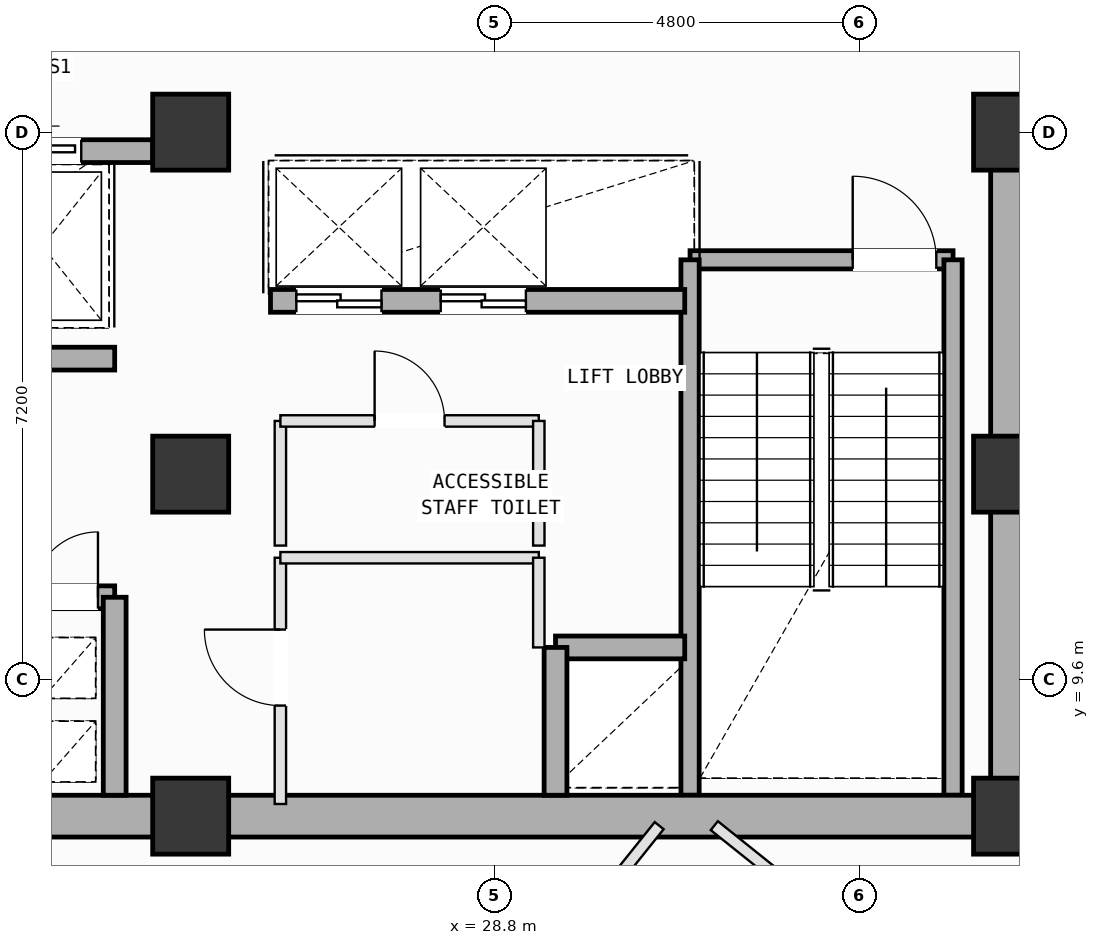
"""IFC4 building model, lengths in metres.
Left out: names, types, materials, properties, quantities, classifications, styles, units other than length and angle.
Written with IfcOpenShell. Run it as: python <this file> out.ifc"""

import sys

from ifc_helpers import new_model, si_unit, direction, frame, frame_2d, origin, origin_2d, place, context, subcontext, project, spatial, rectangle, extrude, element, fill, save


model = new_model("IFC4")
c1 = context("Model", 3, precision=1e-05, world=origin(), true_north=direction((0.0, 1.0)))
c2 = subcontext(c1, "Body", "Model", "MODEL_VIEW")
j1 = project(units=[si_unit("LENGTHUNIT", "METRE"), si_unit("PLANEANGLEUNIT", "RADIAN")], contexts=[c1])
p1 = place(None, origin())
s1 = spatial("IfcSite", under=j1, at=p1, CompositionType="ELEMENT")
p2 = place(p1, origin())
s2 = spatial("IfcBuilding", under=s1, at=p2, CompositionType="ELEMENT")
p3 = place(p2, frame((0.0, 0.0, 243.2)))
s3 = spatial("IfcBuildingStorey", under=s2, at=p3, CompositionType="ELEMENT", Elevation=243.2)
for number, where, z_axis, x_axis in (
    (1, (24.8, 7.8, 0.0), (0.0, 0.0, 1.0), (1.0, 0.0, 0.0)),
    (2, (24.8, 12.3, 0.0), (0.0, 0.0, 1.0), (1.0, 0.0, 0.0)),
    (3, (24.8, 16.8, 0.0), (0.0, 0.0, 1.0), (1.0, 0.0, 0.0)),
    (4, (35.6, 7.8, 0.0), (0.0, 0.0, 1.0), (1.0, 0.0, 0.0)),
    (5, (35.6, 12.3, 0.0), (0.0, 0.0, 1.0), (1.0, 0.0, 0.0)),
    (6, (35.6, 16.8, 0.0), (0.0, 0.0, 1.0), (1.0, 0.0, 0.0)),
):
    element("IfcColumn", number, at=place(p3, frame(where, z_axis=z_axis, x_axis=x_axis)), inside=s3, PredefinedType="COLUMN", context=c2, shape_type="SweptSolid", body=[
        extrude(rectangle(XDim=1.0, YDim=1.0, at=origin_2d()), origin(), (0.0, 0.0, 1.0), 4.0),
    ])
p4 = place(p3, frame((31.37, 15.12, 0.0), z_axis=(0.0, 0.0, 1.0), x_axis=(1.0, 0.0, 0.0)))
e7 = element("IfcWall", 7, at=p4, inside=s3, PredefinedType="SOLIDWALL", context=c2, shape_type="SweptSolid", body=[
    extrude(rectangle(XDim=3.46, YDim=0.24, at=frame_2d((1.73, 0.0))), origin(), (0.0, 0.0, 1.0), 3.78),
])
p5 = place(p4, frame((2.14, 0.0, 0.0)))
e8 = element("IfcOpeningElement", 8, at=p5, cuts=e7, PredefinedType="OPENING", context=c2, shape_type="SweptSolid", body=[
    extrude(rectangle(XDim=1.1, YDim=2.15, at=frame_2d((0.55, 1.075))), frame((0.0, 0.13, 0.0), z_axis=(0.0, -1.0, 0.0), x_axis=(1.0, 0.0, 0.0)), (0.0, 0.0, 1.0), 0.26),
])
for number, where, z_axis, x_axis in (
    (9, (34.83, 15.12, 0.0), (0.0, 0.0, 1.0), (0.0, -1.0, 0.0)),
    (10, (31.37, 8.075, 0.0), (0.0, 0.0, 1.0), (0.0, 1.0, 0.0)),
):
    element("IfcWall", number, at=place(p3, frame(where, z_axis=z_axis, x_axis=x_axis)), inside=s3, PredefinedType="SOLIDWALL", context=c2, shape_type="SweptSolid", body=[
        extrude(rectangle(XDim=7.045, YDim=0.24, at=frame_2d((3.522, 0.0))), origin(), (0.0, 0.0, 1.0), 3.78),
    ])
for number, where, z_axis, x_axis in (
    (11, (14.0, 7.8, 0.0), (0.0, 0.0, 1.0), (1.0, 0.0, 0.0)),
    (12, (24.8, 7.8, 0.0), (0.0, 0.0, 1.0), (1.0, 0.0, 0.0)),
):
    element("IfcWall", number, at=place(p3, frame(where, z_axis=z_axis, x_axis=x_axis)), inside=s3, PredefinedType="SHEAR", context=c2, shape_type="SweptSolid", body=[
        extrude(rectangle(XDim=10.8, YDim=0.55, at=frame_2d((5.4, 0.0))), origin(), (0.0, 0.0, 1.0), 3.78),
    ])
p6 = place(p3, frame((35.6, 7.8, 0.0), z_axis=(0.0, 0.0, 1.0), x_axis=(0.0, 1.0, 0.0)))
e13 = element("IfcWall", 13, at=p6, inside=s3, PredefinedType="SHEAR", context=c2, shape_type="SweptSolid", body=[
    extrude(rectangle(XDim=9.0, YDim=0.55, at=frame_2d((4.5, 0.0))), origin(), (0.0, 0.0, 1.0), 3.78),
])
p7 = place(p3, frame((19.85, 16.55, 0.0), z_axis=(0.0, 0.0, 1.0), x_axis=(1.0, 0.0, 0.0)))
e14 = element("IfcWall", 14, at=p7, inside=s3, PredefinedType="SOLIDWALL", context=c2, shape_type="SweptSolid", body=[
    extrude(rectangle(XDim=4.45, YDim=0.3, at=frame_2d((2.225, 0.0))), origin(), (0.0, 0.0, 1.0), 3.78),
])
p8 = place(p7, frame((0.475, 0.0, 0.0)))
e15 = element("IfcOpeningElement", 15, at=p8, cuts=e14, PredefinedType="OPENING", context=c2, shape_type="SweptSolid", body=[
    extrude(rectangle(XDim=1.25, YDim=2.18, at=frame_2d((0.625, 1.09))), frame((0.0, 0.16, 0.0), z_axis=(0.0, -1.0, 0.0), x_axis=(1.0, 0.0, 0.0)), (0.0, 0.0, 1.0), 0.32),
])
p9 = place(p7, frame((2.49, 0.0, 0.0)))
e16 = element("IfcOpeningElement", 16, at=p9, cuts=e14, PredefinedType="OPENING", context=c2, shape_type="SweptSolid", body=[
    extrude(rectangle(XDim=1.02, YDim=2.12, at=frame_2d((0.51, 1.06))), frame((0.0, 0.16, 0.0), z_axis=(0.0, -1.0, 0.0), x_axis=(1.0, 0.0, 0.0)), (0.0, 0.0, 1.0), 0.32),
])
p10 = place(p3, frame((18.5, 10.68, 0.0), z_axis=(0.0, 0.0, 1.0), x_axis=(1.0, 0.0, 0.0)))
e17 = element("IfcWall", 17, at=p10, inside=s3, PredefinedType="SOLIDWALL", context=c2, shape_type="SweptSolid", body=[
    extrude(rectangle(XDim=5.3, YDim=0.3, at=frame_2d((2.65, 0.0))), origin(), (0.0, 0.0, 1.0), 3.78),
])
p11 = place(p10, frame((4.22, 0.0, 0.0)))
e18 = element("IfcOpeningElement", 18, at=p11, cuts=e17, PredefinedType="OPENING", context=c2, shape_type="SweptSolid", body=[
    extrude(rectangle(XDim=0.86, YDim=2.06, at=frame_2d((0.43, 1.03))), frame((0.0, 0.16, 0.0), z_axis=(0.0, -1.0, 0.0), x_axis=(1.0, 0.0, 0.0)), (0.0, 0.0, 1.0), 0.32),
])
p12 = place(p10, frame((0.425, 0.0, 0.0)))
e19 = element("IfcOpeningElement", 19, at=p12, cuts=e17, PredefinedType="OPENING", context=c2, shape_type="SweptSolid", body=[
    extrude(rectangle(XDim=1.25, YDim=2.18, at=frame_2d((0.625, 1.09))), frame((0.0, 0.16, 0.0), z_axis=(0.0, -1.0, 0.0), x_axis=(1.0, 0.0, 0.0)), (0.0, 0.0, 1.0), 0.32),
])
p13 = place(p10, frame((2.525, 0.0, 0.0)))
e20 = element("IfcOpeningElement", 20, at=p13, cuts=e17, PredefinedType="OPENING", context=c2, shape_type="SweptSolid", body=[
    extrude(rectangle(XDim=1.25, YDim=2.18, at=frame_2d((0.625, 1.09))), frame((0.0, 0.16, 0.0), z_axis=(0.0, -1.0, 0.0), x_axis=(1.0, 0.0, 0.0)), (0.0, 0.0, 1.0), 0.32),
])
p14 = place(p3, frame((18.5, 13.82, 0.0), z_axis=(0.0, 0.0, 1.0), x_axis=(1.0, 0.0, 0.0)))
e21 = element("IfcWall", 21, at=p14, inside=s3, PredefinedType="SOLIDWALL", context=c2, shape_type="SweptSolid", body=[
    extrude(rectangle(XDim=5.3, YDim=0.3, at=frame_2d((2.65, 0.0))), origin(), (0.0, 0.0, 1.0), 3.78),
])
p15 = place(p14, frame((0.18, 0.0, 0.0)))
e22 = element("IfcOpeningElement", 22, at=p15, cuts=e21, PredefinedType="OPENING", context=c2, shape_type="SweptSolid", body=[
    extrude(rectangle(XDim=1.1, YDim=2.15, at=frame_2d((0.55, 1.075))), frame((0.0, 0.16, 0.0), z_axis=(0.0, -1.0, 0.0), x_axis=(1.0, 0.0, 0.0)), (0.0, 0.0, 1.0), 0.32),
])
p16 = place(p3, frame((23.8, 8.075, 0.0), z_axis=(0.0, 0.0, 1.0), x_axis=(0.0, 1.0, 0.0)))
e23 = element("IfcWall", 23, at=p16, inside=s3, PredefinedType="SOLIDWALL", context=c2, shape_type="SweptSolid", body=[
    extrude(rectangle(XDim=2.605, YDim=0.3, at=frame_2d((1.302, 0.0))), origin(), (0.0, 0.0, 1.0), 3.78),
])
p17 = place(p3, frame((29.6, 10.02, 0.0), z_axis=(0.0, 0.0, 1.0), x_axis=(1.0, 0.0, 0.0)))
e24 = element("IfcWall", 24, at=p17, inside=s3, PredefinedType="SOLIDWALL", context=c2, shape_type="SweptSolid", body=[
    extrude(rectangle(XDim=1.7, YDim=0.3, at=frame_2d((0.85, 0.0))), origin(), (0.0, 0.0, 1.0), 3.78),
])
p18 = place(p3, frame((29.6, 8.075, 0.0), z_axis=(0.0, 0.0, 1.0), x_axis=(0.0, 1.0, 0.0)))
e25 = element("IfcWall", 25, at=p18, inside=s3, PredefinedType="SOLIDWALL", context=c2, shape_type="SweptSolid", body=[
    extrude(rectangle(XDim=1.945, YDim=0.3, at=frame_2d((0.973, 0.0))), origin(), (0.0, 0.0, 1.0), 3.78),
])
p19 = place(p3, frame((25.85, 14.58, 0.0), z_axis=(0.0, 0.0, 1.0), x_axis=(1.0, 0.0, 0.0)))
e26 = element("IfcWall", 26, at=p19, inside=s3, PredefinedType="SOLIDWALL", context=c2, shape_type="SweptSolid", body=[
    extrude(rectangle(XDim=5.45, YDim=0.3, at=frame_2d((2.725, 0.0))), origin(), (0.0, 0.0, 1.0), 3.78),
])
p20 = place(p19, frame((0.34, 0.0, 0.0)))
e27 = element("IfcOpeningElement", 27, at=p20, cuts=e26, PredefinedType="OPENING", context=c2, shape_type="SweptSolid", body=[
    extrude(rectangle(XDim=1.12, YDim=2.15, at=frame_2d((0.56, 1.075))), frame((0.0, 0.16, 0.0), z_axis=(0.0, -1.0, 0.0), x_axis=(1.0, 0.0, 0.0)), (0.0, 0.0, 1.0), 0.32),
])
p21 = place(p19, frame((2.24, 0.0, 0.0)))
e28 = element("IfcOpeningElement", 28, at=p21, cuts=e26, PredefinedType="OPENING", context=c2, shape_type="SweptSolid", body=[
    extrude(rectangle(XDim=1.12, YDim=2.15, at=frame_2d((0.56, 1.075))), frame((0.0, 0.16, 0.0), z_axis=(0.0, -1.0, 0.0), x_axis=(1.0, 0.0, 0.0)), (0.0, 0.0, 1.0), 0.32),
])
p22 = place(p3, frame((25.98, 7.96, 0.0), z_axis=(0.0, 0.0, 1.0), x_axis=(0.0, 1.0, 0.0)))
e29 = element("IfcWall", 29, at=p22, inside=s3, PredefinedType="PARTITIONING", context=c2, shape_type="SweptSolid", body=[
    extrude(rectangle(XDim=3.24, YDim=0.15, at=frame_2d((1.62, 0.0))), origin(), (0.0, 0.0, 1.0), 3.78),
])
p23 = place(p22, frame((1.295, 0.0, 0.0)))
e30 = element("IfcOpeningElement", 30, at=p23, cuts=e29, PredefinedType="OPENING", context=c2, shape_type="SweptSolid", body=[
    extrude(rectangle(XDim=1.0, YDim=2.12, at=frame_2d((0.5, 1.06))), frame((0.0, 0.085, 0.0), z_axis=(0.0, -1.0, 0.0), x_axis=(1.0, 0.0, 0.0)), (0.0, 0.0, 1.0), 0.17),
])
p24 = place(p3, frame((25.98, 11.2, 0.0), z_axis=(0.0, 0.0, 1.0), x_axis=(1.0, 0.0, 0.0)))
e31 = element("IfcWall", 31, at=p24, inside=s3, PredefinedType="PARTITIONING", context=c2, shape_type="SweptSolid", body=[
    extrude(rectangle(XDim=3.4, YDim=0.15, at=frame_2d((1.7, 0.0))), origin(), (0.0, 0.0, 1.0), 3.78),
])
p25 = place(p3, frame((29.38, 11.2, 0.0), z_axis=(0.0, 0.0, 1.0), x_axis=(0.0, -1.0, 0.0)))
e32 = element("IfcWall", 32, at=p25, inside=s3, PredefinedType="PARTITIONING", context=c2, shape_type="SweptSolid", body=[
    extrude(rectangle(XDim=1.18, YDim=0.15, at=frame_2d((0.59, 0.0))), origin(), (0.0, 0.0, 1.0), 3.78),
])
p26 = place(p3, frame((25.98, 11.36, 0.0), z_axis=(0.0, 0.0, 1.0), x_axis=(0.0, 1.0, 0.0)))
e33 = element("IfcWall", 33, at=p26, inside=s3, PredefinedType="PARTITIONING", context=c2, shape_type="SweptSolid", body=[
    extrude(rectangle(XDim=1.64, YDim=0.15, at=frame_2d((0.82, 0.0))), origin(), (0.0, 0.0, 1.0), 3.78),
])
p27 = place(p3, frame((25.98, 13.0, 0.0), z_axis=(0.0, 0.0, 1.0), x_axis=(1.0, 0.0, 0.0)))
e34 = element("IfcWall", 34, at=p27, inside=s3, PredefinedType="PARTITIONING", context=c2, shape_type="SweptSolid", body=[
    extrude(rectangle(XDim=3.4, YDim=0.15, at=frame_2d((1.7, 0.0))), origin(), (0.0, 0.0, 1.0), 3.78),
])
p28 = place(p27, frame((1.24, 0.0, 0.0)))
e35 = element("IfcOpeningElement", 35, at=p28, cuts=e34, PredefinedType="OPENING", context=c2, shape_type="SweptSolid", body=[
    extrude(rectangle(XDim=0.92, YDim=2.1, at=frame_2d((0.46, 1.05))), frame((0.0, 0.085, 0.0), z_axis=(0.0, -1.0, 0.0), x_axis=(1.0, 0.0, 0.0)), (0.0, 0.0, 1.0), 0.17),
])
p29 = place(p3, frame((29.38, 13.0, 0.0), z_axis=(0.0, 0.0, 1.0), x_axis=(0.0, -1.0, 0.0)))
e36 = element("IfcWall", 36, at=p29, inside=s3, PredefinedType="PARTITIONING", context=c2, shape_type="SweptSolid", body=[
    extrude(rectangle(XDim=1.64, YDim=0.15, at=frame_2d((0.82, 0.0))), origin(), (0.0, 0.0, 1.0), 3.78),
])
p30 = place(p3, frame((23.26, -1.941, 0.0), z_axis=(0.0, 0.0, 1.0), x_axis=(0.625255482182, 0.780420131725, 0.0)))
e37 = element("IfcWall", 37, at=p30, inside=s3, PredefinedType="PARTITIONING", context=c2, shape_type="SweptSolid", body=[
    extrude(rectangle(XDim=12.322, YDim=0.15, at=frame_2d((6.161, 0.0))), origin(), (0.0, 0.0, 1.0), 3.78),
])
p31 = place(p3, frame((31.689, 7.675, 0.0), z_axis=(0.0, 0.0, 1.0), x_axis=(0.78039660669, -0.625284844105, 0.0)))
e38 = element("IfcWall", 38, at=p31, inside=s3, PredefinedType="PARTITIONING", context=c2, shape_type="SweptSolid", body=[
    extrude(rectangle(XDim=12.919, YDim=0.15, at=frame_2d((6.459, 0.0))), origin(), (0.0, 0.0, 1.0), 3.78),
])
p32 = place(p31, frame((6.29, 0.0, 0.0)))
e39 = element("IfcOpeningElement", 39, at=p32, cuts=e38, PredefinedType="OPENING", context=c2, shape_type="SweptSolid", body=[
    extrude(rectangle(XDim=0.86, YDim=2.06, at=frame_2d((0.43, 1.03))), frame((0.0, 0.085, 0.0), z_axis=(0.0, -1.0, 0.0), x_axis=(1.0, 0.0, 0.0)), (0.0, 0.0, 1.0), 0.17),
])
p33 = place(p3, frame((35.6, 7.5, 0.0), z_axis=(0.0, 0.0, 1.0), x_axis=(1.0, 0.0, 0.0)))
e40 = element("IfcWall", 40, at=p33, inside=s3, PredefinedType="PARTITIONING", context=c2, shape_type="SweptSolid", body=[
    extrude(rectangle(XDim=0.55, YDim=0.15, at=frame_2d((0.275, 0.0))), origin(), (0.0, 0.0, 1.0), 3.78),
])
p34 = place(p5, origin())
e41 = element("IfcDoor", 41, at=p34, inside=s3, OperationType="SINGLE_SWING_LEFT", PredefinedType="DOOR", context=c2, shape_type="SweptSolid", body=[
    extrude(rectangle(XDim=1.1, YDim=2.15, at=frame_2d((0.55, 1.075))), frame((0.0, 0.025, 0.0), z_axis=(0.0, -1.0, 0.0), x_axis=(1.0, 0.0, 0.0)), (0.0, 0.0, 1.0), 0.05),
])
fill(e8, e41)
p35 = place(p11, origin())
e42 = element("IfcDoor", 42, at=p35, inside=s3, OperationType="SINGLE_SWING_RIGHT", PredefinedType="DOOR", context=c2, shape_type="SweptSolid", body=[
    extrude(rectangle(XDim=0.86, YDim=2.06, at=frame_2d((0.43, 1.03))), frame((0.0, 0.025, 0.0), z_axis=(0.0, -1.0, 0.0), x_axis=(1.0, 0.0, 0.0)), (0.0, 0.0, 1.0), 0.05),
])
fill(e18, e42)
p36 = place(p20, origin())
e43 = element("IfcDoor", 43, at=p36, inside=s3, OperationType="DOUBLE_DOOR_SLIDING", PredefinedType="DOOR", context=c2, shape_type="SweptSolid", body=[
    extrude(rectangle(XDim=1.12, YDim=2.15, at=frame_2d((0.56, 1.075))), frame((0.0, 0.025, 0.0), z_axis=(0.0, -1.0, 0.0), x_axis=(1.0, 0.0, 0.0)), (0.0, 0.0, 1.0), 0.05),
])
fill(e27, e43)
p37 = place(p21, origin())
e44 = element("IfcDoor", 44, at=p37, inside=s3, OperationType="DOUBLE_DOOR_SLIDING", PredefinedType="DOOR", context=c2, shape_type="SweptSolid", body=[
    extrude(rectangle(XDim=1.12, YDim=2.15, at=frame_2d((0.56, 1.075))), frame((0.0, 0.025, 0.0), z_axis=(0.0, -1.0, 0.0), x_axis=(1.0, 0.0, 0.0)), (0.0, 0.0, 1.0), 0.05),
])
fill(e28, e44)
p38 = place(p9, origin())
e45 = element("IfcDoor", 45, at=p38, inside=s3, OperationType="SLIDING_TO_LEFT", PredefinedType="DOOR", context=c2, shape_type="SweptSolid", body=[
    extrude(rectangle(XDim=1.02, YDim=2.12, at=frame_2d((0.51, 1.06))), frame((0.0, 0.025, 0.0), z_axis=(0.0, -1.0, 0.0), x_axis=(1.0, 0.0, 0.0)), (0.0, 0.0, 1.0), 0.05),
])
fill(e16, e45)
p39 = place(p23, origin())
e46 = element("IfcDoor", 46, at=p39, inside=s3, OperationType="SINGLE_SWING_RIGHT", PredefinedType="DOOR", context=c2, shape_type="SweptSolid", body=[
    extrude(rectangle(XDim=1.0, YDim=2.12, at=frame_2d((0.5, 1.06))), frame((0.0, 0.025, 0.0), z_axis=(0.0, -1.0, 0.0), x_axis=(1.0, 0.0, 0.0)), (0.0, 0.0, 1.0), 0.05),
])
fill(e30, e46)
p40 = place(p28, origin())
e47 = element("IfcDoor", 47, at=p40, inside=s3, OperationType="SINGLE_SWING_LEFT", PredefinedType="DOOR", context=c2, shape_type="SweptSolid", body=[
    extrude(rectangle(XDim=0.92, YDim=2.1, at=frame_2d((0.46, 1.05))), frame((0.0, 0.025, 0.0), z_axis=(0.0, -1.0, 0.0), x_axis=(1.0, 0.0, 0.0)), (0.0, 0.0, 1.0), 0.05),
])
fill(e35, e47)
save(model, sys.argv[1])
